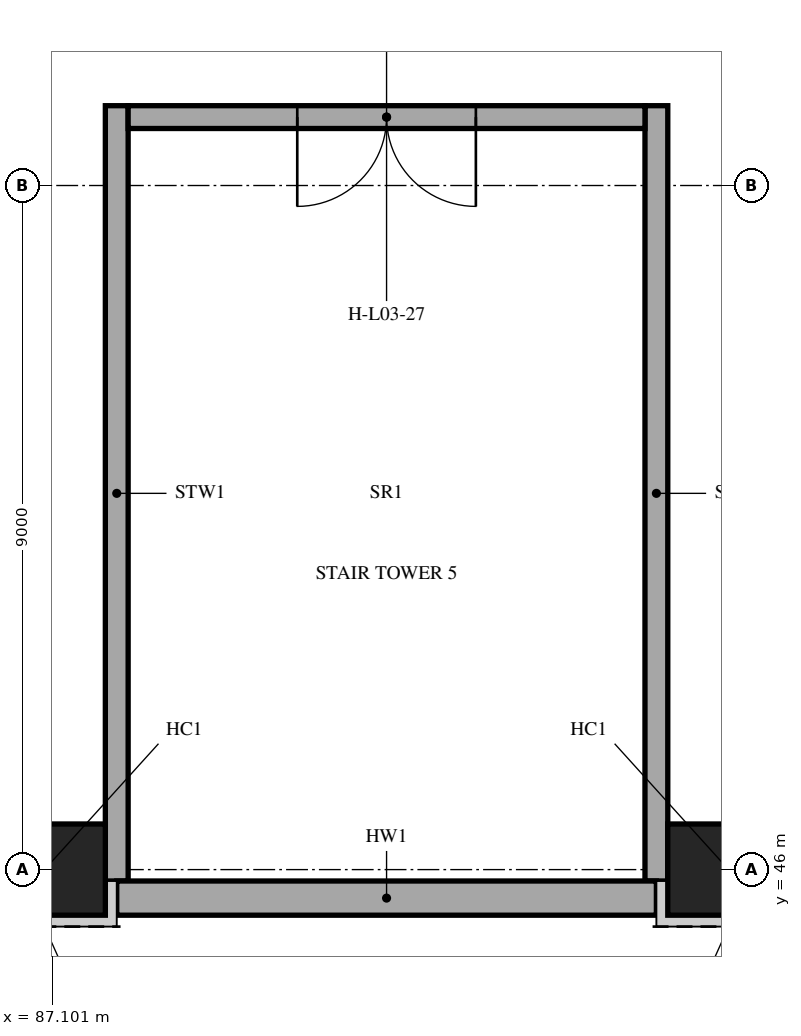
"""IFC4 building model, lengths in metres.
Left out: names, types, materials, properties, quantities, classifications, styles, units other than length and angle.
Written with IfcOpenShell. Run it as: python <this file> out.ifc"""

import sys

from ifc_helpers import new_model, si_unit, direction, frame, frame_2d, origin, origin_2d, place, context, subcontext, project, spatial, rectangle, extrude, element, fill, save


model = new_model("IFC4")
c1 = context("Model", 3, precision=1e-05, world=origin(), true_north=direction((0.0, 1.0)))
c2 = subcontext(c1, "Body", "Model", "MODEL_VIEW")
j1 = project(units=[si_unit("LENGTHUNIT", "METRE"), si_unit("PLANEANGLEUNIT", "RADIAN")], contexts=[c1])
p1 = place(None, origin())
s1 = spatial("IfcSite", under=j1, at=p1, CompositionType="ELEMENT")
p2 = place(p1, origin())
s2 = spatial("IfcBuilding", under=s1, at=p2, CompositionType="ELEMENT")
p3 = place(p2, frame((0.0, 0.0, 15.0)))
s3 = spatial("IfcBuildingStorey", under=s2, at=p3, CompositionType="ELEMENT", Elevation=15.0)
for number, where, z_axis, x_axis in (
    (1, (87.0, 46.0, 0.0), (0.0, 0.0, 1.0), (1.0, 0.0, 0.0)),
    (2, (96.0, 46.0, 0.0), (0.0, 0.0, 1.0), (1.0, 0.0, 0.0)),
):
    element("IfcColumn", number, at=place(p3, frame(where, z_axis=z_axis, x_axis=x_axis)), inside=s3, PredefinedType="COLUMN", context=c2, shape_type="SweptSolid", body=[
        extrude(rectangle(XDim=1.6, YDim=1.2, at=origin_2d()), origin(), (0.0, 0.0, 1.0), 4.2),
    ])
for number, where, z_axis, x_axis in (
    (3, (87.95, 45.85, 0.0), (0.0, 0.0, 1.0), (0.0, 1.0, 0.0)),
    (4, (95.05, 45.85, 0.0), (0.0, 0.0, 1.0), (0.0, 1.0, 0.0)),
):
    element("IfcWall", number, at=place(p3, frame(where, z_axis=z_axis, x_axis=x_axis)), inside=s3, PredefinedType="SHEAR", context=c2, shape_type="SweptSolid", body=[
        extrude(rectangle(XDim=10.2, YDim=0.3, at=frame_2d((5.1, 0.0))), origin(), (0.0, 0.0, 1.0), 3.9),
    ])
p4 = place(p3, frame((88.1, 55.9, 0.0), z_axis=(0.0, 0.0, 1.0), x_axis=(1.0, 0.0, 0.0)))
e5 = element("IfcWall", 5, at=p4, inside=s3, PredefinedType="SHEAR", context=c2, shape_type="SweptSolid", body=[
    extrude(rectangle(XDim=6.8, YDim=0.3, at=frame_2d((3.4, 0.0))), origin(), (0.0, 0.0, 1.0), 3.9),
])
p5 = place(p4, frame((2.225, 0.0, 0.0)))
e6 = element("IfcOpeningElement", 6, at=p5, cuts=e5, PredefinedType="OPENING", context=c2, shape_type="SweptSolid", body=[
    extrude(rectangle(XDim=2.35, YDim=2.1, at=frame_2d((1.175, 1.05))), frame((0.0, 0.16, 0.0), z_axis=(0.0, -1.0, 0.0), x_axis=(1.0, 0.0, 0.0)), (0.0, 0.0, 1.0), 0.32),
])
p6 = place(p3, frame((87.95, 45.625, 0.0), z_axis=(0.0, 0.0, 1.0), x_axis=(1.0, 0.0, 0.0)))
e7 = element("IfcWall", 7, at=p6, inside=s3, PredefinedType="SOLIDWALL", context=c2, shape_type="SweptSolid", body=[
    extrude(rectangle(XDim=7.1, YDim=0.45, at=frame_2d((3.55, 0.0))), origin(), (0.0, 0.0, 1.0), 4.2),
])
p7 = place(p5, frame((2.35, 0.0, 0.0), z_axis=(0.0, 0.0, 1.0), x_axis=(-1.0, 0.0, 0.0)))
e8 = element("IfcDoor", 8, at=p7, inside=s3, OperationType="DOUBLE_DOOR_SINGLE_SWING", PredefinedType="DOOR", context=c2, shape_type="SweptSolid", body=[
    extrude(rectangle(XDim=2.35, YDim=2.1, at=frame_2d((1.175, 1.05))), frame((0.0, 0.025, 0.0), z_axis=(0.0, -1.0, 0.0), x_axis=(1.0, 0.0, 0.0)), (0.0, 0.0, 1.0), 0.05),
])
fill(e6, e8)
save(model, sys.argv[1])
